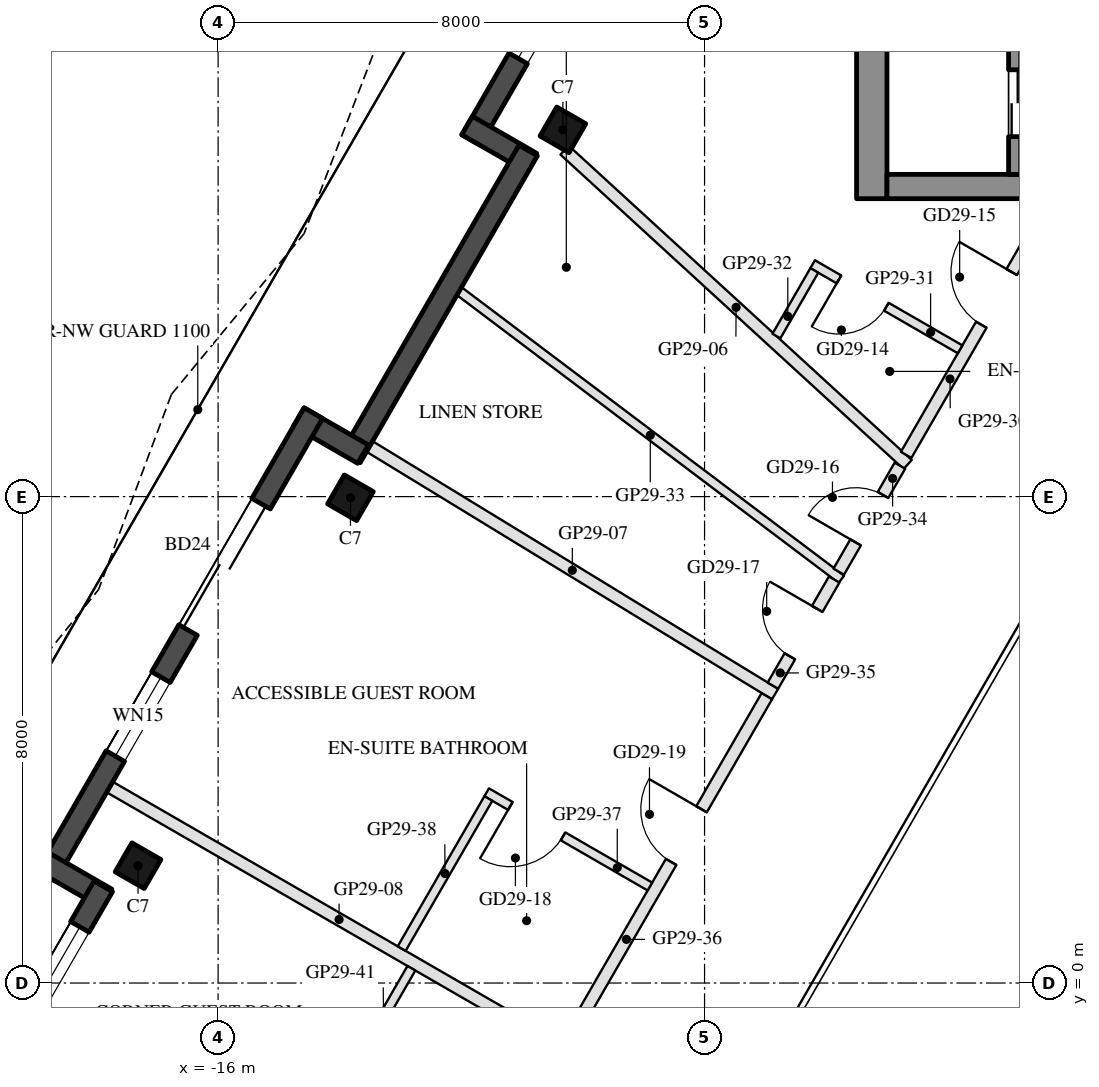
"""IFC4 building model, lengths in metres.
Left out: names, types, materials, properties, quantities, classifications, styles, units other than length and angle.
Written with IfcOpenShell. Run it as: python <this file> out.ifc"""

import sys

from ifc_helpers import new_model, si_unit, direction, frame, frame_2d, origin, origin_2d, place, context, subcontext, project, spatial, rectangle, hollow_rectangle, extrude, boolean, halfspace, element, fill, save


model = new_model("IFC4")
c1 = context("Model", 3, precision=1e-05, world=origin(), true_north=direction((0.0, 1.0)))
c2 = subcontext(c1, "Body", "Model", "MODEL_VIEW")
j1 = project(units=[si_unit("LENGTHUNIT", "METRE"), si_unit("PLANEANGLEUNIT", "RADIAN")], contexts=[c1])
p1 = place(None, origin())
s1 = spatial("IfcSite", under=j1, at=p1, CompositionType="ELEMENT")
p2 = place(p1, origin())
s2 = spatial("IfcBuilding", under=s1, at=p2, CompositionType="ELEMENT")
p3 = place(p2, frame((0.0, 0.0, 294.8)))
s3 = spatial("IfcBuildingStorey", under=s2, at=p3, CompositionType="ELEMENT", Elevation=294.8)
p4 = place(p3, frame((-10.33, 14.032, 0.0), z_axis=(0.0, 0.0, 1.0), x_axis=(0.5, 0.866025403784, 0.0)))
e1 = element("IfcColumn", 1, at=p4, inside=s3, PredefinedType="COLUMN", context=c2, shape_type="SweptSolid", body=[
    boolean("DIFFERENCE", extrude(hollow_rectangle(XDim=0.55, YDim=0.55, WallThickness=0.025, at=origin_2d()), origin(), (0.0, 0.0, 1.0), 3.7), halfspace(frame((0.0, 0.0, 3.666), z_axis=(0.0, 0.0, 1.0), x_axis=(1.0, 0.0, 0.0)), False)),
])
p5 = place(p3, frame((-13.823, 7.981, 0.0), z_axis=(0.0, 0.0, 1.0), x_axis=(0.5, 0.866025403784, 0.0)))
e2 = element("IfcColumn", 2, at=p5, inside=s3, PredefinedType="COLUMN", context=c2, shape_type="SweptSolid", body=[
    boolean("DIFFERENCE", extrude(hollow_rectangle(XDim=0.55, YDim=0.55, WallThickness=0.025, at=origin_2d()), origin(), (0.0, 0.0, 1.0), 3.7), halfspace(frame((0.0, 0.0, 3.668), z_axis=(0.0, 0.0, 1.0), x_axis=(1.0, 0.0, 0.0)), False)),
])
p6 = place(p3, frame((-17.317, 1.93, 0.0), z_axis=(0.0, 0.0, 1.0), x_axis=(0.5, 0.866025403784, 0.0)))
e3 = element("IfcColumn", 3, at=p6, inside=s3, PredefinedType="COLUMN", context=c2, shape_type="SweptSolid", body=[
    boolean("DIFFERENCE", extrude(hollow_rectangle(XDim=0.55, YDim=0.55, WallThickness=0.025, at=origin_2d()), origin(), (0.0, 0.0, 1.0), 3.7), halfspace(frame((0.0, 0.0, 3.666), z_axis=(0.0, 0.0, 1.0), x_axis=(1.0, 0.0, 0.0)), False)),
])
p7 = place(p3, frame((-6.563, 23.005, 0.0), z_axis=(0.0, 0.0, 1.0), x_axis=(-0.500010118922, -0.866019561543, 0.0)))
e4 = element("IfcWall", 4, at=p7, inside=s3, PredefinedType="SOLIDWALL", context=c2, shape_type="SweptSolid", body=[
    extrude(rectangle(XDim=10.554, YDim=0.35, at=frame_2d((5.277, 0.0))), origin(), (0.0, 0.0, 1.0), 3.55),
])
p8 = place(p7, frame((0.38, 0.0, 0.3)))
e5 = element("IfcOpeningElement", 5, at=p8, cuts=e4, PredefinedType="OPENING", context=c2, shape_type="SweptSolid", body=[
    extrude(rectangle(XDim=1.6, YDim=2.65, at=frame_2d((0.8, 1.325))), frame((0.0, 0.185, 0.0), z_axis=(0.0, -1.0, 0.0), x_axis=(1.0, 0.0, 0.0)), (0.0, 0.0, 1.0), 0.37),
])
p9 = place(p7, frame((3.798, 0.0, 0.0)))
e6 = element("IfcOpeningElement", 6, at=p9, cuts=e4, PredefinedType="OPENING", context=c2, shape_type="SweptSolid", body=[
    extrude(rectangle(XDim=2.4, YDim=2.4, at=frame_2d((1.2, 1.2))), frame((0.0, 0.185, 0.0), z_axis=(0.0, -1.0, 0.0), x_axis=(1.0, 0.0, 0.0)), (0.0, 0.0, 1.0), 0.37),
])
p10 = place(p7, frame((7.404, 0.0, 0.3)))
e7 = element("IfcOpeningElement", 7, at=p10, cuts=e4, PredefinedType="OPENING", context=c2, shape_type="SweptSolid", body=[
    extrude(rectangle(XDim=1.6, YDim=2.65, at=frame_2d((0.8, 1.325))), frame((0.0, 0.185, 0.0), z_axis=(0.0, -1.0, 0.0), x_axis=(1.0, 0.0, 0.0)), (0.0, 0.0, 1.0), 0.37),
])
p11 = place(p3, frame((-11.905, 14.104, 0.0), z_axis=(0.0, 0.0, 1.0), x_axis=(0.866005645448, -0.500034220881, 0.0)))
e8 = element("IfcWall", 8, at=p11, inside=s3, PredefinedType="SOLIDWALL", context=c2, shape_type="SweptSolid", body=[
    extrude(rectangle(XDim=1.22, YDim=0.35, at=frame_2d((0.61, 0.0))), origin(), (0.0, 0.0, 1.0), 3.55),
])
p12 = place(p3, frame((-10.901, 13.692, 0.0), z_axis=(0.0, 0.0, 1.0), x_axis=(-0.499987198161, -0.866032794804, 0.0)))
e9 = element("IfcWall", 9, at=p12, inside=s3, PredefinedType="SOLIDWALL", context=c2, shape_type="SweptSolid", body=[
    extrude(rectangle(XDim=5.827, YDim=0.35, at=frame_2d((2.914, 0.0))), origin(), (0.0, 0.0, 1.0), 3.55),
])
p13 = place(p3, frame((-13.616, 8.698, 0.0), z_axis=(0.0, 0.0, 1.0), x_axis=(-0.866005645448, 0.500034220881, 0.0)))
e10 = element("IfcWall", 10, at=p13, inside=s3, PredefinedType="SOLIDWALL", context=c2, shape_type="SweptSolid", body=[
    extrude(rectangle(XDim=1.22, YDim=0.35, at=frame_2d((0.61, 0.0))), origin(), (0.0, 0.0, 1.0), 3.55),
])
p14 = place(p3, frame((-14.434, 9.373, 0.0), z_axis=(0.0, 0.0, 1.0), x_axis=(-0.499999835575, -0.866025498715, 0.0)))
e11 = element("IfcWall", 11, at=p14, inside=s3, PredefinedType="SOLIDWALL", context=c2, shape_type="SweptSolid", body=[
    extrude(rectangle(XDim=8.787, YDim=0.35, at=frame_2d((4.394, 0.0))), origin(), (0.0, 0.0, 1.0), 3.55),
])
p15 = place(p14, frame((1.719, 0.0, 0.0)))
e12 = element("IfcOpeningElement", 12, at=p15, cuts=e11, PredefinedType="OPENING", context=c2, shape_type="SweptSolid", body=[
    extrude(rectangle(XDim=2.4, YDim=2.4, at=frame_2d((1.2, 1.2))), frame((0.0, 0.185, 0.0), z_axis=(0.0, -1.0, 0.0), x_axis=(1.0, 0.0, 0.0)), (0.0, 0.0, 1.0), 0.37),
])
p16 = place(p14, frame((5.013, 0.0, 0.3)))
e13 = element("IfcOpeningElement", 13, at=p16, cuts=e11, PredefinedType="OPENING", context=c2, shape_type="SweptSolid", body=[
    extrude(rectangle(XDim=1.5, YDim=2.65, at=frame_2d((0.75, 1.325))), frame((0.0, 0.185, 0.0), z_axis=(0.0, -1.0, 0.0), x_axis=(1.0, 0.0, 0.0)), (0.0, 0.0, 1.0), 0.37),
])
p17 = place(p3, frame((-18.892, 2.002, 0.0), z_axis=(0.0, 0.0, 1.0), x_axis=(0.866042269935, -0.499970785833, 0.0)))
e14 = element("IfcWall", 14, at=p17, inside=s3, PredefinedType="SOLIDWALL", context=c2, shape_type="SweptSolid", body=[
    extrude(rectangle(XDim=1.22, YDim=0.35, at=frame_2d((0.61, 0.0))), origin(), (0.0, 0.0, 1.0), 3.55),
])
p18 = place(p3, frame((-17.888, 1.59, 0.0), z_axis=(0.0, 0.0, 1.0), x_axis=(-0.499987198161, -0.866032794804, 0.0)))
e15 = element("IfcWall", 15, at=p18, inside=s3, PredefinedType="SOLIDWALL", context=c2, shape_type="SweptSolid", body=[
    extrude(rectangle(XDim=5.827, YDim=0.35, at=frame_2d((2.914, 0.0))), origin(), (0.0, 0.0, 1.0), 3.55),
])
p19 = place(p18, frame((2.657, 0.0, 0.0)))
e16 = element("IfcOpeningElement", 16, at=p19, cuts=e15, PredefinedType="OPENING", context=c2, shape_type="SweptSolid", body=[
    extrude(rectangle(XDim=2.4, YDim=2.4, at=frame_2d((1.2, 1.2))), frame((0.0, 0.185, 0.0), z_axis=(0.0, -1.0, 0.0), x_axis=(1.0, 0.0, 0.0)), (0.0, 0.0, 1.0), 0.37),
])
p20 = place(p18, frame((0.77, 0.0, 0.3)))
e17 = element("IfcOpeningElement", 17, at=p20, cuts=e15, PredefinedType="OPENING", context=c2, shape_type="SweptSolid", body=[
    extrude(rectangle(XDim=1.5, YDim=2.65, at=frame_2d((0.75, 1.325))), frame((0.0, 0.185, 0.0), z_axis=(0.0, -1.0, 0.0), x_axis=(1.0, 0.0, 0.0)), (0.0, 0.0, 1.0), 0.37),
])
p21 = place(p3, frame((-5.25, 12.9, 0.0), z_axis=(0.0, 0.0, 1.0), x_axis=(0.0, 1.0, 0.0)))
e18 = element("IfcWall", 18, at=p21, inside=s3, PredefinedType="SHEAR", context=c2, shape_type="SweptSolid", body=[
    extrude(rectangle(XDim=11.222, YDim=0.5, at=frame_2d((5.611, 0.0))), origin(), (0.0, 0.0, 1.0), 3.5),
])
p22 = place(p3, frame((5.0, 13.1, 0.0), z_axis=(0.0, 0.0, 1.0), x_axis=(-1.0, 0.0, 0.0)))
e19 = element("IfcWall", 19, at=p22, inside=s3, PredefinedType="SHEAR", context=c2, shape_type="SweptSolid", body=[
    extrude(rectangle(XDim=10.0, YDim=0.4, at=frame_2d((5.0, 0.0))), origin(), (0.0, 0.0, 1.0), 3.5),
])
p23 = place(p22, frame((3.55, 0.0, 0.0)))
e20 = element("IfcOpeningElement", 20, at=p23, cuts=e19, PredefinedType="OPENING", context=c2, shape_type="SweptSolid", body=[
    extrude(rectangle(XDim=1.1, YDim=2.1, at=frame_2d((0.55, 1.05))), frame((0.0, 0.21, 0.0), z_axis=(0.0, -1.0, 0.0), x_axis=(1.0, 0.0, 0.0)), (0.0, 0.0, 1.0), 0.42),
])
p24 = place(p22, frame((5.85, 0.0, 0.0)))
e21 = element("IfcOpeningElement", 21, at=p24, cuts=e19, PredefinedType="OPENING", context=c2, shape_type="SweptSolid", body=[
    extrude(rectangle(XDim=1.4, YDim=2.1, at=frame_2d((0.7, 1.05))), frame((0.0, 0.21, 0.0), z_axis=(0.0, -1.0, 0.0), x_axis=(1.0, 0.0, 0.0)), (0.0, 0.0, 1.0), 0.42),
])
p25 = place(p3, frame((-2.9, 13.3, 0.0), z_axis=(0.0, 0.0, 1.0), x_axis=(0.0, 1.0, 0.0)))
e22 = element("IfcWall", 22, at=p25, inside=s3, PredefinedType="SHEAR", context=c2, shape_type="SweptSolid", body=[
    extrude(rectangle(XDim=10.16, YDim=0.2, at=frame_2d((5.08, 0.0))), origin(), (0.0, 0.0, 1.0), 3.5),
])
p26 = place(p25, frame((0.62, 0.0, 0.0)))
e23 = element("IfcOpeningElement", 23, at=p26, cuts=e22, PredefinedType="OPENING", context=c2, shape_type="SweptSolid", body=[
    extrude(rectangle(XDim=1.1, YDim=2.1, at=frame_2d((0.55, 1.05))), frame((0.0, 0.11, 0.0), z_axis=(0.0, -1.0, 0.0), x_axis=(1.0, 0.0, 0.0)), (0.0, 0.0, 1.0), 0.22),
])
p27 = place(p25, frame((3.16, 0.0, 0.0)))
e24 = element("IfcOpeningElement", 24, at=p27, cuts=e22, PredefinedType="OPENING", context=c2, shape_type="SweptSolid", body=[
    extrude(rectangle(XDim=1.1, YDim=2.1, at=frame_2d((0.55, 1.05))), frame((0.0, 0.11, 0.0), z_axis=(0.0, -1.0, 0.0), x_axis=(1.0, 0.0, 0.0)), (0.0, 0.0, 1.0), 0.22),
])
p28 = place(p25, frame((5.7, 0.0, 0.0)))
e25 = element("IfcOpeningElement", 25, at=p28, cuts=e22, PredefinedType="OPENING", context=c2, shape_type="SweptSolid", body=[
    extrude(rectangle(XDim=1.1, YDim=2.1, at=frame_2d((0.55, 1.05))), frame((0.0, 0.11, 0.0), z_axis=(0.0, -1.0, 0.0), x_axis=(1.0, 0.0, 0.0)), (0.0, 0.0, 1.0), 0.22),
])
p29 = place(p25, frame((8.34, 0.0, 0.0)))
e26 = element("IfcOpeningElement", 26, at=p29, cuts=e22, PredefinedType="OPENING", context=c2, shape_type="SweptSolid", body=[
    extrude(rectangle(XDim=0.9, YDim=2.1, at=frame_2d((0.45, 1.05))), frame((0.0, 0.11, 0.0), z_axis=(0.0, -1.0, 0.0), x_axis=(1.0, 0.0, 0.0)), (0.0, 0.0, 1.0), 0.22),
])
p30 = place(p3, frame((-10.302, 13.698, 0.0), z_axis=(0.0, 0.0, 1.0), x_axis=(0.737268015828, -0.675600379541, 0.0)))
e27 = element("IfcWall", 27, at=p30, inside=s3, PredefinedType="PARTITIONING", context=c2, shape_type="SweptSolid", body=[
    extrude(rectangle(XDim=7.653, YDim=0.2, at=frame_2d((3.826, 0.0))), origin(), (0.0, 0.0, 1.0), 3.1),
])
p31 = place(p3, frame((-13.509, 8.825, 0.0), z_axis=(0.0, 0.0, 1.0), x_axis=(0.853427769022, -0.521211130984, 0.0)))
e28 = element("IfcWall", 28, at=p31, inside=s3, PredefinedType="PARTITIONING", context=c2, shape_type="SweptSolid", body=[
    extrude(rectangle(XDim=7.814, YDim=0.2, at=frame_2d((3.907, 0.0))), origin(), (0.0, 0.0, 1.0), 3.1),
])
p32 = place(p3, frame((-17.782, 3.223, 0.0), z_axis=(0.0, 0.0, 1.0), x_axis=(0.866016642396, -0.500015174863, 0.0)))
e29 = element("IfcWall", 29, at=p32, inside=s3, PredefinedType="PARTITIONING", context=c2, shape_type="SweptSolid", body=[
    extrude(rectangle(XDim=8.712, YDim=0.2, at=frame_2d((4.356, 0.0))), origin(), (0.0, 0.0, 1.0), 3.1),
])
p33 = place(p3, frame((-4.685, 8.686, 0.0), z_axis=(0.0, 0.0, 1.0), x_axis=(0.500011088314, 0.866019001848, 0.0)))
e30 = element("IfcWall", 30, at=p33, inside=s3, PredefinedType="PARTITIONING", context=c2, shape_type="SweptSolid", body=[
    extrude(rectangle(XDim=4.808, YDim=0.2, at=frame_2d((2.404, 0.0))), origin(), (0.0, 0.0, 1.0), 3.05),
])
p34 = place(p33, frame((2.472, 0.0, 0.0)))
e31 = element("IfcOpeningElement", 31, at=p34, cuts=e30, PredefinedType="OPENING", context=c2, shape_type="SweptSolid", body=[
    extrude(rectangle(XDim=1.0, YDim=2.1, at=frame_2d((0.5, 1.05))), frame((0.0, 0.11, 0.0), z_axis=(0.0, -1.0, 0.0), x_axis=(1.0, 0.0, 0.0)), (0.0, 0.0, 1.0), 0.22),
])
p35 = place(p3, frame((-3.798, 10.423, 0.0), z_axis=(0.0, 0.0, 1.0), x_axis=(-0.866034573852, 0.49998411664, 0.0)))
e32 = element("IfcWall", 32, at=p35, inside=s3, PredefinedType="PARTITIONING", context=c2, shape_type="SweptSolid", body=[
    extrude(rectangle(XDim=2.8, YDim=0.15, at=frame_2d((1.4, 0.0))), origin(), (0.0, 0.0, 1.0), 3.05),
])
p36 = place(p35, frame((1.4, 0.0, 0.0)))
e33 = element("IfcOpeningElement", 33, at=p36, cuts=e32, PredefinedType="OPENING", context=c2, shape_type="SweptSolid", body=[
    extrude(rectangle(XDim=0.9, YDim=2.1, at=frame_2d((0.45, 1.05))), frame((0.0, 0.085, 0.0), z_axis=(0.0, -1.0, 0.0), x_axis=(1.0, 0.0, 0.0)), (0.0, 0.0, 1.0), 0.17),
])
p37 = place(p3, frame((-6.195, 11.72, 0.0), z_axis=(0.0, 0.0, 1.0), x_axis=(-0.500016430238, -0.866015917575, 0.0)))
e34 = element("IfcWall", 34, at=p37, inside=s3, PredefinedType="PARTITIONING", context=c2, shape_type="SweptSolid", body=[
    extrude(rectangle(XDim=1.246, YDim=0.15, at=frame_2d((0.623, 0.0))), origin(), (0.0, 0.0, 1.0), 3.05),
])
p38 = place(p3, frame((-12.034, 11.379, 0.0), z_axis=(0.0, 0.0, 1.0), x_axis=(0.798392848023, -0.602136911528, 0.0)))
e35 = element("IfcWall", 35, at=p38, inside=s3, PredefinedType="PARTITIONING", context=c2, shape_type="SweptSolid", body=[
    extrude(rectangle(XDim=7.871, YDim=0.15, at=frame_2d((3.936, 0.0))), origin(), (0.0, 0.0, 1.0), 3.05),
])
p39 = place(p3, frame((-5.793, 6.766, 0.0), z_axis=(0.0, 0.0, 1.0), x_axis=(0.500026968848, 0.866009832753, 0.0)))
e36 = element("IfcWall", 36, at=p39, inside=s3, PredefinedType="PARTITIONING", context=c2, shape_type="SweptSolid", body=[
    extrude(rectangle(XDim=2.013, YDim=0.2, at=frame_2d((1.006, 0.0))), origin(), (0.0, 0.0, 1.0), 3.05),
])
p40 = place(p39, frame((0.556, 0.0, 0.0)))
e37 = element("IfcOpeningElement", 37, at=p40, cuts=e36, PredefinedType="OPENING", context=c2, shape_type="SweptSolid", body=[
    extrude(rectangle(XDim=0.9, YDim=2.1, at=frame_2d((0.45, 1.05))), frame((0.0, 0.11, 0.0), z_axis=(0.0, -1.0, 0.0), x_axis=(1.0, 0.0, 0.0)), (0.0, 0.0, 1.0), 0.22),
])
p41 = place(p3, frame((-6.876, 4.891, 0.0), z_axis=(0.0, 0.0, 1.0), x_axis=(0.499865783083, 0.866102880092, 0.0)))
e38 = element("IfcWall", 38, at=p41, inside=s3, PredefinedType="PARTITIONING", context=c2, shape_type="SweptSolid", body=[
    extrude(rectangle(XDim=2.015, YDim=0.2, at=frame_2d((1.008, 0.0))), origin(), (0.0, 0.0, 1.0), 3.55),
])
p42 = place(p41, frame((0.558, 0.0, 0.0)))
e39 = element("IfcOpeningElement", 39, at=p42, cuts=e38, PredefinedType="OPENING", context=c2, shape_type="SweptSolid", body=[
    extrude(rectangle(XDim=0.9, YDim=2.1, at=frame_2d((0.45, 1.05))), frame((0.0, 0.11, 0.0), z_axis=(0.0, -1.0, 0.0), x_axis=(1.0, 0.0, 0.0)), (0.0, 0.0, 1.0), 0.22),
])
p43 = place(p3, frame((-10.275, -0.996, 0.0), z_axis=(0.0, 0.0, 1.0), x_axis=(0.500007539231, 0.866021050964, 0.0)))
e40 = element("IfcWall", 40, at=p43, inside=s3, PredefinedType="PARTITIONING", context=c2, shape_type="SweptSolid", body=[
    extrude(rectangle(XDim=6.598, YDim=0.2, at=frame_2d((3.299, 0.0))), origin(), (0.0, 0.0, 1.0), 3.05),
])
p44 = place(p43, frame((3.45, 0.0, 0.0)))
e41 = element("IfcOpeningElement", 41, at=p44, cuts=e40, PredefinedType="OPENING", context=c2, shape_type="SweptSolid", body=[
    extrude(rectangle(XDim=1.0, YDim=2.1, at=frame_2d((0.5, 1.05))), frame((0.0, 0.11, 0.0), z_axis=(0.0, -1.0, 0.0), x_axis=(1.0, 0.0, 0.0)), (0.0, 0.0, 1.0), 0.22),
])
p45 = place(p3, frame((-8.899, 1.587, 0.0), z_axis=(0.0, 0.0, 1.0), x_axis=(-0.86602952684, 0.49999285859, 0.0)))
e42 = element("IfcWall", 42, at=p45, inside=s3, PredefinedType="PARTITIONING", context=c2, shape_type="SweptSolid", body=[
    extrude(rectangle(XDim=3.1, YDim=0.15, at=frame_2d((1.55, 0.0))), origin(), (0.0, 0.0, 1.0), 3.55),
])
p46 = place(p45, frame((1.65, 0.0, 0.0)))
e43 = element("IfcOpeningElement", 43, at=p46, cuts=e42, PredefinedType="OPENING", context=c2, shape_type="SweptSolid", body=[
    extrude(rectangle(XDim=1.0, YDim=2.1, at=frame_2d((0.5, 1.05))), frame((0.0, 0.085, 0.0), z_axis=(0.0, -1.0, 0.0), x_axis=(1.0, 0.0, 0.0)), (0.0, 0.0, 1.0), 0.17),
])
p47 = place(p3, frame((-11.556, 3.034, 0.0), z_axis=(0.0, 0.0, 1.0), x_axis=(-0.500036373335, -0.866004402611, 0.0)))
e44 = element("IfcWall", 44, at=p47, inside=s3, PredefinedType="PARTITIONING", context=c2, shape_type="SweptSolid", body=[
    extrude(rectangle(XDim=2.85, YDim=0.15, at=frame_2d((1.425, 0.0))), origin(), (0.0, 0.0, 1.0), 3.05),
])
p48 = place(p3, frame((-12.821, 0.243, 0.0), z_axis=(0.0, 0.0, 1.0), x_axis=(-0.500009850223, -0.866019716681, 0.0)))
e45 = element("IfcWall", 45, at=p48, inside=s3, PredefinedType="PARTITIONING", context=c2, shape_type="SweptSolid", body=[
    extrude(rectangle(XDim=1.838, YDim=0.15, at=frame_2d((0.919, 0.0))), origin(), (0.0, 0.0, 1.0), 3.05),
])
p49 = place(p10, origin())
e46 = element("IfcWindow", 46, at=p49, inside=s3, PartitioningType="SINGLE_PANEL", PredefinedType="WINDOW", context=c2, shape_type="SweptSolid", body=[
    extrude(rectangle(XDim=1.6, YDim=2.65, at=frame_2d((0.8, 1.325))), frame((0.0, 0.03, 0.0), z_axis=(0.0, -1.0, 0.0), x_axis=(1.0, 0.0, 0.0)), (0.0, 0.0, 1.0), 0.06),
])
fill(e7, e46)
p50 = place(p15, frame((2.4, 0.0, 0.0), z_axis=(0.0, 0.0, 1.0), x_axis=(-1.0, 0.0, 0.0)))
e47 = element("IfcDoor", 47, at=p50, inside=s3, OperationType="SLIDING_TO_LEFT", PredefinedType="DOOR", context=c2, shape_type="SweptSolid", body=[
    extrude(rectangle(XDim=2.4, YDim=2.4, at=frame_2d((1.2, 1.2))), frame((0.0, 0.025, 0.0), z_axis=(0.0, -1.0, 0.0), x_axis=(1.0, 0.0, 0.0)), (0.0, 0.0, 1.0), 0.05),
])
fill(e12, e47)
p51 = place(p16, origin())
e48 = element("IfcWindow", 48, at=p51, inside=s3, PartitioningType="SINGLE_PANEL", PredefinedType="WINDOW", context=c2, shape_type="SweptSolid", body=[
    extrude(rectangle(XDim=1.5, YDim=2.65, at=frame_2d((0.75, 1.325))), frame((0.0, 0.03, 0.0), z_axis=(0.0, -1.0, 0.0), x_axis=(1.0, 0.0, 0.0)), (0.0, 0.0, 1.0), 0.06),
])
fill(e13, e48)
p52 = place(p20, origin())
e49 = element("IfcWindow", 49, at=p52, inside=s3, PartitioningType="SINGLE_PANEL", PredefinedType="WINDOW", context=c2, shape_type="SweptSolid", body=[
    extrude(rectangle(XDim=1.5, YDim=2.65, at=frame_2d((0.75, 1.325))), frame((0.0, 0.03, 0.0), z_axis=(0.0, -1.0, 0.0), x_axis=(1.0, 0.0, 0.0)), (0.0, 0.0, 1.0), 0.06),
])
fill(e17, e49)
p53 = place(p26, origin())
e50 = element("IfcDoor", 50, at=p53, inside=s3, OperationType="DOUBLE_DOOR_SLIDING", PredefinedType="DOOR", context=c2, shape_type="SweptSolid", body=[
    extrude(rectangle(XDim=1.1, YDim=2.1, at=frame_2d((0.55, 1.05))), frame((0.0, 0.025, 0.0), z_axis=(0.0, -1.0, 0.0), x_axis=(1.0, 0.0, 0.0)), (0.0, 0.0, 1.0), 0.05),
])
fill(e23, e50)
p54 = place(p36, origin())
e51 = element("IfcDoor", 51, at=p54, inside=s3, OperationType="SINGLE_SWING_RIGHT", PredefinedType="DOOR", context=c2, shape_type="SweptSolid", body=[
    extrude(rectangle(XDim=0.9, YDim=2.1, at=frame_2d((0.45, 1.05))), frame((0.0, 0.025, 0.0), z_axis=(0.0, -1.0, 0.0), x_axis=(1.0, 0.0, 0.0)), (0.0, 0.0, 1.0), 0.05),
])
fill(e33, e51)
p55 = place(p34, origin())
e52 = element("IfcDoor", 52, at=p55, inside=s3, OperationType="SINGLE_SWING_RIGHT", PredefinedType="DOOR", context=c2, shape_type="SweptSolid", body=[
    extrude(rectangle(XDim=1.0, YDim=2.1, at=frame_2d((0.5, 1.05))), frame((0.0, 0.025, 0.0), z_axis=(0.0, -1.0, 0.0), x_axis=(1.0, 0.0, 0.0)), (0.0, 0.0, 1.0), 0.05),
])
fill(e31, e52)
p56 = place(p40, origin())
e53 = element("IfcDoor", 53, at=p56, inside=s3, OperationType="SINGLE_SWING_LEFT", PredefinedType="DOOR", context=c2, shape_type="SweptSolid", body=[
    extrude(rectangle(XDim=0.9, YDim=2.1, at=frame_2d((0.45, 1.05))), frame((0.0, 0.025, 0.0), z_axis=(0.0, -1.0, 0.0), x_axis=(1.0, 0.0, 0.0)), (0.0, 0.0, 1.0), 0.05),
])
fill(e37, e53)
p57 = place(p42, origin())
e54 = element("IfcDoor", 54, at=p57, inside=s3, OperationType="SINGLE_SWING_RIGHT", PredefinedType="DOOR", context=c2, shape_type="SweptSolid", body=[
    extrude(rectangle(XDim=0.9, YDim=2.1, at=frame_2d((0.45, 1.05))), frame((0.0, 0.025, 0.0), z_axis=(0.0, -1.0, 0.0), x_axis=(1.0, 0.0, 0.0)), (0.0, 0.0, 1.0), 0.05),
])
fill(e39, e54)
p58 = place(p46, origin())
e55 = element("IfcDoor", 55, at=p58, inside=s3, OperationType="SINGLE_SWING_RIGHT", PredefinedType="DOOR", context=c2, shape_type="SweptSolid", body=[
    extrude(rectangle(XDim=1.0, YDim=2.1, at=frame_2d((0.5, 1.05))), frame((0.0, 0.025, 0.0), z_axis=(0.0, -1.0, 0.0), x_axis=(1.0, 0.0, 0.0)), (0.0, 0.0, 1.0), 0.05),
])
fill(e43, e55)
p59 = place(p44, origin())
e56 = element("IfcDoor", 56, at=p59, inside=s3, OperationType="SINGLE_SWING_RIGHT", PredefinedType="DOOR", context=c2, shape_type="SweptSolid", body=[
    extrude(rectangle(XDim=1.0, YDim=2.1, at=frame_2d((0.5, 1.05))), frame((0.0, 0.025, 0.0), z_axis=(0.0, -1.0, 0.0), x_axis=(1.0, 0.0, 0.0)), (0.0, 0.0, 1.0), 0.05),
])
fill(e41, e56)
save(model, sys.argv[1])
